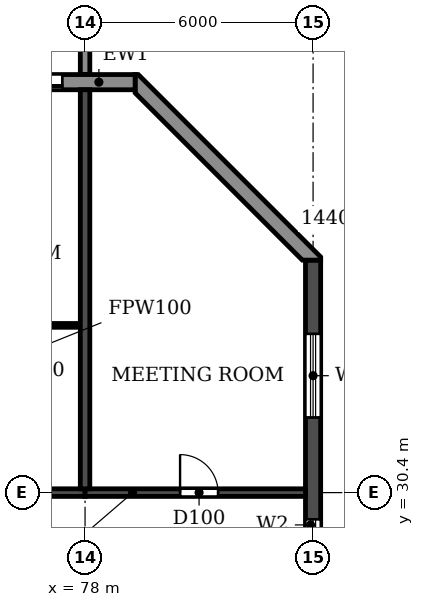
"""IFC4 building model, lengths in metres.
Left out: names, types, materials, properties, quantities, classifications, styles, units other than length and angle.
Written with IfcOpenShell. Run it as: python <this file> out.ifc"""

import sys

from ifc_helpers import new_model, si_unit, direction, frame, frame_2d, origin, place, context, subcontext, project, spatial, polyline, rectangle, outline, extrude, source, transform, mapped, element, fill, save


model = new_model("IFC4")
c1 = context("Model", 3, precision=1e-05, world=origin(), true_north=direction((0.0, 1.0)))
c2 = subcontext(c1, "Body", "Model", "MODEL_VIEW")
j1 = project(units=[si_unit("LENGTHUNIT", "METRE"), si_unit("PLANEANGLEUNIT", "RADIAN")], contexts=[c1])
p1 = place(None, origin())
s1 = spatial("IfcSite", under=j1, at=p1, CompositionType="ELEMENT")
p2 = place(p1, origin())
s2 = spatial("IfcBuilding", under=s1, at=p2, CompositionType="ELEMENT")
p3 = place(p2, frame((0.0, 0.0, 241.2)))
s3 = spatial("IfcBuildingStorey", under=s2, at=p3, CompositionType="ELEMENT", Elevation=241.2)
p4 = place(p3, frame((78.0, 30.5, 0.0), z_axis=(0.0, 0.0, 1.0), x_axis=(0.0, 1.0, 0.0)))
e1 = element("IfcWall", 1, at=p4, inside=s3, PredefinedType="SHEAR", context=c2, shape_type="SweptSolid", body=[
    extrude(rectangle(XDim=10.5, YDim=0.25, at=frame_2d((5.25, 0.0))), origin(), (0.0, 0.0, 1.0), 3.08),
])
p5 = place(p3, frame((84.0, 4.683, 0.0), z_axis=(0.0, 0.0, 1.0), x_axis=(0.0, 1.0, 0.0)))
e2 = element("IfcWall", 2, at=p5, inside=s3, PredefinedType="SHEAR", context=c2, shape_type="SweptSolid", body=[
    extrude(rectangle(XDim=31.834, YDim=0.4, at=frame_2d((15.917, 0.0))), origin(), (0.0, 0.0, 1.0), 3.08),
])
p6 = place(p5, frame((23.817, 0.0, 0.9)))
e3 = element("IfcOpeningElement", 3, at=p6, cuts=e2, PredefinedType="OPENING", context=c2, shape_type="SweptSolid", body=[
    extrude(rectangle(XDim=1.2, YDim=1.5, at=frame_2d((0.6, 0.75))), frame((0.0, 0.21, 0.0), z_axis=(0.0, -1.0, 0.0), x_axis=(1.0, 0.0, 0.0)), (0.0, 0.0, 1.0), 0.42),
])
p7 = place(p5, frame((8.017, 0.0, 0.9)))
e4 = element("IfcOpeningElement", 4, at=p7, cuts=e2, PredefinedType="OPENING", context=c2, shape_type="SweptSolid", body=[
    extrude(rectangle(XDim=1.2, YDim=1.5, at=frame_2d((0.6, 0.75))), frame((0.0, 0.21, 0.0), z_axis=(0.0, -1.0, 0.0), x_axis=(1.0, 0.0, 0.0)), (0.0, 0.0, 1.0), 0.42),
])
p8 = place(p5, frame((27.694, 0.0, 0.6)))
e5 = element("IfcOpeningElement", 5, at=p8, cuts=e2, PredefinedType="OPENING", context=c2, shape_type="SweptSolid", body=[
    extrude(rectangle(XDim=2.2, YDim=1.8, at=frame_2d((1.1, 0.9))), frame((0.0, 0.21, 0.0), z_axis=(0.0, -1.0, 0.0), x_axis=(1.0, 0.0, 0.0)), (0.0, 0.0, 1.0), 0.42),
])
p9 = place(p5, frame((2.541, 0.0, 0.6)))
e6 = element("IfcOpeningElement", 6, at=p9, cuts=e2, PredefinedType="OPENING", context=c2, shape_type="SweptSolid", body=[
    extrude(rectangle(XDim=2.2, YDim=1.8, at=frame_2d((1.1, 0.9))), frame((0.0, 0.21, 0.0), z_axis=(0.0, -1.0, 0.0), x_axis=(1.0, 0.0, 0.0)), (0.0, 0.0, 1.0), 0.42),
])
p10 = place(p5, frame((15.917, 0.0, 0.9)))
e7 = element("IfcOpeningElement", 7, at=p10, cuts=e2, PredefinedType="OPENING", context=c2, shape_type="SweptSolid", body=[
    extrude(rectangle(XDim=1.2, YDim=1.5, at=frame_2d((0.6, 0.75))), frame((0.0, 0.21, 0.0), z_axis=(0.0, -1.0, 0.0), x_axis=(1.0, 0.0, 0.0)), (0.0, 0.0, 1.0), 0.42),
])
p11 = place(p3, frame((72.0, 30.4, 0.0), z_axis=(0.0, 0.0, 1.0), x_axis=(1.0, 0.0, 0.0)))
e8 = element("IfcWall", 8, at=p11, inside=s3, PredefinedType="SHEAR", context=c2, shape_type="SweptSolid", body=[
    extrude(rectangle(XDim=6.0, YDim=0.2, at=frame_2d((3.0, 0.0))), origin(), (0.0, 0.0, 1.0), 2.48),
])
p12 = place(p11, frame((2.55, 0.0, 0.0)))
e9 = element("IfcOpeningElement", 9, at=p12, cuts=e8, PredefinedType="OPENING", context=c2, shape_type="SweptSolid", body=[
    extrude(rectangle(XDim=1.0, YDim=2.1, at=frame_2d((0.5, 1.05))), frame((0.0, 0.11, 0.0), z_axis=(0.0, -1.0, 0.0), x_axis=(1.0, 0.0, 0.0)), (0.0, 0.0, 1.0), 0.22),
])
p13 = place(p3, frame((78.0, 30.4, 0.0), z_axis=(0.0, 0.0, 1.0), x_axis=(1.0, 0.0, 0.0)))
e10 = element("IfcWall", 10, at=p13, inside=s3, PredefinedType="SHEAR", context=c2, shape_type="SweptSolid", body=[
    extrude(rectangle(XDim=5.8, YDim=0.2, at=frame_2d((2.9, 0.0))), origin(), (0.0, 0.0, 1.0), 2.48),
])
p14 = place(p13, frame((2.5, 0.0, 0.0)))
e11 = element("IfcOpeningElement", 11, at=p14, cuts=e10, PredefinedType="OPENING", context=c2, shape_type="SweptSolid", body=[
    extrude(rectangle(XDim=1.0, YDim=2.1, at=frame_2d((0.5, 1.05))), frame((0.0, 0.11, 0.0), z_axis=(0.0, -1.0, 0.0), x_axis=(1.0, 0.0, 0.0)), (0.0, 0.0, 1.0), 0.22),
])
p15 = place(p3, origin())
e12 = element("IfcWall", 12, at=p15, inside=s3, PredefinedType="STANDARD", context=c2, shape_type="SweptSolid", body=[
    extrude(outline(polyline([(84.2, 36.517), (84.2, 36.6), (79.4, 41.4), (79.317, 41.4), (79.317, 40.917), (83.717, 36.517), (84.2, 36.517)])), origin(), (0.0, 0.0, 1.0), 3.08),
])
p16 = place(p3, frame((79.317, 41.2, 0.0), z_axis=(0.0, 0.0, 1.0), x_axis=(-1.0, 0.0, 0.0)))
e13 = element("IfcWall", 13, at=p16, inside=s3, PredefinedType="STANDARD", context=c2, shape_type="SweptSolid", body=[
    extrude(rectangle(XDim=56.634, YDim=0.4, at=frame_2d((28.317, 0.0))), origin(), (0.0, 0.0, 1.0), 3.08),
])
p17 = place(p16, frame((52.917, 0.0, 0.0)))
e14 = element("IfcOpeningElement", 14, at=p17, cuts=e13, PredefinedType="OPENING", context=c2, shape_type="SweptSolid", body=[
    extrude(rectangle(XDim=1.8, YDim=2.4, at=frame_2d((0.9, 1.2))), frame((0.0, 0.21, 0.0), z_axis=(0.0, -1.0, 0.0), x_axis=(1.0, 0.0, 0.0)), (0.0, 0.0, 1.0), 0.42),
])
p18 = place(p16, frame((49.717, 0.0, 0.9)))
e15 = element("IfcOpeningElement", 15, at=p18, cuts=e13, PredefinedType="OPENING", context=c2, shape_type="SweptSolid", body=[
    extrude(rectangle(XDim=2.2, YDim=1.5, at=frame_2d((1.1, 0.75))), frame((0.0, 0.21, 0.0), z_axis=(0.0, -1.0, 0.0), x_axis=(1.0, 0.0, 0.0)), (0.0, 0.0, 1.0), 0.42),
])
p19 = place(p16, frame((46.717, 0.0, 0.9)))
e16 = element("IfcOpeningElement", 16, at=p19, cuts=e13, PredefinedType="OPENING", context=c2, shape_type="SweptSolid", body=[
    extrude(rectangle(XDim=2.2, YDim=1.5, at=frame_2d((1.1, 0.75))), frame((0.0, 0.21, 0.0), z_axis=(0.0, -1.0, 0.0), x_axis=(1.0, 0.0, 0.0)), (0.0, 0.0, 1.0), 0.42),
])
p20 = place(p16, frame((43.717, 0.0, 0.9)))
e17 = element("IfcOpeningElement", 17, at=p20, cuts=e13, PredefinedType="OPENING", context=c2, shape_type="SweptSolid", body=[
    extrude(rectangle(XDim=2.2, YDim=1.5, at=frame_2d((1.1, 0.75))), frame((0.0, 0.21, 0.0), z_axis=(0.0, -1.0, 0.0), x_axis=(1.0, 0.0, 0.0)), (0.0, 0.0, 1.0), 0.42),
])
p21 = place(p16, frame((40.917, 0.0, 0.0)))
e18 = element("IfcOpeningElement", 18, at=p21, cuts=e13, PredefinedType="OPENING", context=c2, shape_type="SweptSolid", body=[
    extrude(rectangle(XDim=1.8, YDim=2.4, at=frame_2d((0.9, 1.2))), frame((0.0, 0.21, 0.0), z_axis=(0.0, -1.0, 0.0), x_axis=(1.0, 0.0, 0.0)), (0.0, 0.0, 1.0), 0.42),
])
p22 = place(p16, frame((37.717, 0.0, 0.9)))
e19 = element("IfcOpeningElement", 19, at=p22, cuts=e13, PredefinedType="OPENING", context=c2, shape_type="SweptSolid", body=[
    extrude(rectangle(XDim=2.2, YDim=1.5, at=frame_2d((1.1, 0.75))), frame((0.0, 0.21, 0.0), z_axis=(0.0, -1.0, 0.0), x_axis=(1.0, 0.0, 0.0)), (0.0, 0.0, 1.0), 0.42),
])
p23 = place(p16, frame((34.717, 0.0, 0.9)))
e20 = element("IfcOpeningElement", 20, at=p23, cuts=e13, PredefinedType="OPENING", context=c2, shape_type="SweptSolid", body=[
    extrude(rectangle(XDim=2.2, YDim=1.5, at=frame_2d((1.1, 0.75))), frame((0.0, 0.21, 0.0), z_axis=(0.0, -1.0, 0.0), x_axis=(1.0, 0.0, 0.0)), (0.0, 0.0, 1.0), 0.42),
])
p24 = place(p16, frame((31.717, 0.0, 0.9)))
e21 = element("IfcOpeningElement", 21, at=p24, cuts=e13, PredefinedType="OPENING", context=c2, shape_type="SweptSolid", body=[
    extrude(rectangle(XDim=2.2, YDim=1.5, at=frame_2d((1.1, 0.75))), frame((0.0, 0.21, 0.0), z_axis=(0.0, -1.0, 0.0), x_axis=(1.0, 0.0, 0.0)), (0.0, 0.0, 1.0), 0.42),
])
p25 = place(p16, frame((28.717, 0.0, 0.9)))
e22 = element("IfcOpeningElement", 22, at=p25, cuts=e13, PredefinedType="OPENING", context=c2, shape_type="SweptSolid", body=[
    extrude(rectangle(XDim=2.2, YDim=1.5, at=frame_2d((1.1, 0.75))), frame((0.0, 0.21, 0.0), z_axis=(0.0, -1.0, 0.0), x_axis=(1.0, 0.0, 0.0)), (0.0, 0.0, 1.0), 0.42),
])
p26 = place(p16, frame((25.917, 0.0, 0.0)))
e23 = element("IfcOpeningElement", 23, at=p26, cuts=e13, PredefinedType="OPENING", context=c2, shape_type="SweptSolid", body=[
    extrude(rectangle(XDim=1.8, YDim=2.4, at=frame_2d((0.9, 1.2))), frame((0.0, 0.21, 0.0), z_axis=(0.0, -1.0, 0.0), x_axis=(1.0, 0.0, 0.0)), (0.0, 0.0, 1.0), 0.42),
])
p27 = place(p16, frame((22.717, 0.0, 0.9)))
e24 = element("IfcOpeningElement", 24, at=p27, cuts=e13, PredefinedType="OPENING", context=c2, shape_type="SweptSolid", body=[
    extrude(rectangle(XDim=2.2, YDim=1.5, at=frame_2d((1.1, 0.75))), frame((0.0, 0.21, 0.0), z_axis=(0.0, -1.0, 0.0), x_axis=(1.0, 0.0, 0.0)), (0.0, 0.0, 1.0), 0.42),
])
p28 = place(p16, frame((19.717, 0.0, 0.9)))
e25 = element("IfcOpeningElement", 25, at=p28, cuts=e13, PredefinedType="OPENING", context=c2, shape_type="SweptSolid", body=[
    extrude(rectangle(XDim=2.2, YDim=1.5, at=frame_2d((1.1, 0.75))), frame((0.0, 0.21, 0.0), z_axis=(0.0, -1.0, 0.0), x_axis=(1.0, 0.0, 0.0)), (0.0, 0.0, 1.0), 0.42),
])
p29 = place(p16, frame((16.717, 0.0, 0.9)))
e26 = element("IfcOpeningElement", 26, at=p29, cuts=e13, PredefinedType="OPENING", context=c2, shape_type="SweptSolid", body=[
    extrude(rectangle(XDim=2.2, YDim=1.5, at=frame_2d((1.1, 0.75))), frame((0.0, 0.21, 0.0), z_axis=(0.0, -1.0, 0.0), x_axis=(1.0, 0.0, 0.0)), (0.0, 0.0, 1.0), 0.42),
])
p30 = place(p16, frame((13.917, 0.0, 0.0)))
e27 = element("IfcOpeningElement", 27, at=p30, cuts=e13, PredefinedType="OPENING", context=c2, shape_type="SweptSolid", body=[
    extrude(rectangle(XDim=1.8, YDim=2.4, at=frame_2d((0.9, 1.2))), frame((0.0, 0.21, 0.0), z_axis=(0.0, -1.0, 0.0), x_axis=(1.0, 0.0, 0.0)), (0.0, 0.0, 1.0), 0.42),
])
p31 = place(p16, frame((10.717, 0.0, 0.9)))
e28 = element("IfcOpeningElement", 28, at=p31, cuts=e13, PredefinedType="OPENING", context=c2, shape_type="SweptSolid", body=[
    extrude(rectangle(XDim=2.2, YDim=1.5, at=frame_2d((1.1, 0.75))), frame((0.0, 0.21, 0.0), z_axis=(0.0, -1.0, 0.0), x_axis=(1.0, 0.0, 0.0)), (0.0, 0.0, 1.0), 0.42),
])
p32 = place(p16, frame((7.917, 0.0, 0.0)))
e29 = element("IfcOpeningElement", 29, at=p32, cuts=e13, PredefinedType="OPENING", context=c2, shape_type="SweptSolid", body=[
    extrude(rectangle(XDim=1.8, YDim=2.4, at=frame_2d((0.9, 1.2))), frame((0.0, 0.21, 0.0), z_axis=(0.0, -1.0, 0.0), x_axis=(1.0, 0.0, 0.0)), (0.0, 0.0, 1.0), 0.42),
])
p33 = place(p16, frame((4.717, 0.0, 0.9)))
e30 = element("IfcOpeningElement", 30, at=p33, cuts=e13, PredefinedType="OPENING", context=c2, shape_type="SweptSolid", body=[
    extrude(rectangle(XDim=2.2, YDim=1.5, at=frame_2d((1.1, 0.75))), frame((0.0, 0.21, 0.0), z_axis=(0.0, -1.0, 0.0), x_axis=(1.0, 0.0, 0.0)), (0.0, 0.0, 1.0), 0.42),
])
p34 = place(p16, frame((1.917, 0.0, 0.0)))
e31 = element("IfcOpeningElement", 31, at=p34, cuts=e13, PredefinedType="OPENING", context=c2, shape_type="SweptSolid", body=[
    extrude(rectangle(XDim=1.8, YDim=2.4, at=frame_2d((0.9, 1.2))), frame((0.0, 0.21, 0.0), z_axis=(0.0, -1.0, 0.0), x_axis=(1.0, 0.0, 0.0)), (0.0, 0.0, 1.0), 0.42),
])
m1 = source(origin(), c2, "Body", "SweptSolid", [
    extrude(outline(polyline([(0.0, 0.0), (0.25, 0.0), (0.25, 3.1), (0.0, 3.1), (0.0, 0.0)])), origin(), (0.0, 0.0, 1.0), 3.1),
])
p35 = place(p3, frame((77.875, 41.4, 0.0)))
e32 = element("IfcWall", 32, at=p35, inside=s3, PredefinedType="STANDARD", context=c2, shape_type="MappedRepresentation", body=[
    mapped(m1, transform((0.0, 0.0, 0.0))),
])
p36 = place(p3, frame((75.9, 34.8, 0.0), z_axis=(0.0, 0.0, 1.0), x_axis=(1.0, 0.0, 0.0)))
e33 = element("IfcWall", 33, at=p36, inside=s3, PredefinedType="PARTITIONING", context=c2, shape_type="SweptSolid", body=[
    extrude(rectangle(XDim=1.965, YDim=0.1, at=frame_2d((0.982, 0.0))), origin(), (0.0, 0.0, 1.0), 3.08),
])
p37 = place(p6, origin())
e34 = element("IfcWindow", 34, at=p37, inside=s3, PartitioningType="SINGLE_PANEL", PredefinedType="WINDOW", context=c2, shape_type="SweptSolid", body=[
    extrude(rectangle(XDim=1.2, YDim=1.5, at=frame_2d((0.6, 0.75))), frame((0.0, 0.03, 0.0), z_axis=(0.0, -1.0, 0.0), x_axis=(1.0, 0.0, 0.0)), (0.0, 0.0, 1.0), 0.06),
])
fill(e3, e34)
p38 = place(p8, origin())
e35 = element("IfcWindow", 35, at=p38, inside=s3, PartitioningType="DOUBLE_PANEL_HORIZONTAL", PredefinedType="WINDOW", context=c2, shape_type="SweptSolid", body=[
    extrude(rectangle(XDim=2.2, YDim=1.8, at=frame_2d((1.1, 0.9))), frame((0.0, 0.03, 0.0), z_axis=(0.0, -1.0, 0.0), x_axis=(1.0, 0.0, 0.0)), (0.0, 0.0, 1.0), 0.06),
])
fill(e5, e35)
p39 = place(p34, origin())
e36 = element("IfcDoor", 36, at=p39, inside=s3, OperationType="DOUBLE_DOOR_SLIDING", PredefinedType="DOOR", context=c2, shape_type="SweptSolid", body=[
    extrude(rectangle(XDim=1.8, YDim=2.4, at=frame_2d((0.9, 1.2))), frame((0.0, 0.025, 0.0), z_axis=(0.0, -1.0, 0.0), x_axis=(1.0, 0.0, 0.0)), (0.0, 0.0, 1.0), 0.05),
])
fill(e31, e36)
p40 = place(p14, origin())
e37 = element("IfcDoor", 37, at=p40, inside=s3, OperationType="SINGLE_SWING_LEFT", PredefinedType="DOOR", context=c2, shape_type="SweptSolid", body=[
    extrude(rectangle(XDim=1.0, YDim=2.1, at=frame_2d((0.5, 1.05))), frame((0.0, 0.025, 0.0), z_axis=(0.0, -1.0, 0.0), x_axis=(1.0, 0.0, 0.0)), (0.0, 0.0, 1.0), 0.05),
])
fill(e11, e37)
save(model, sys.argv[1])
